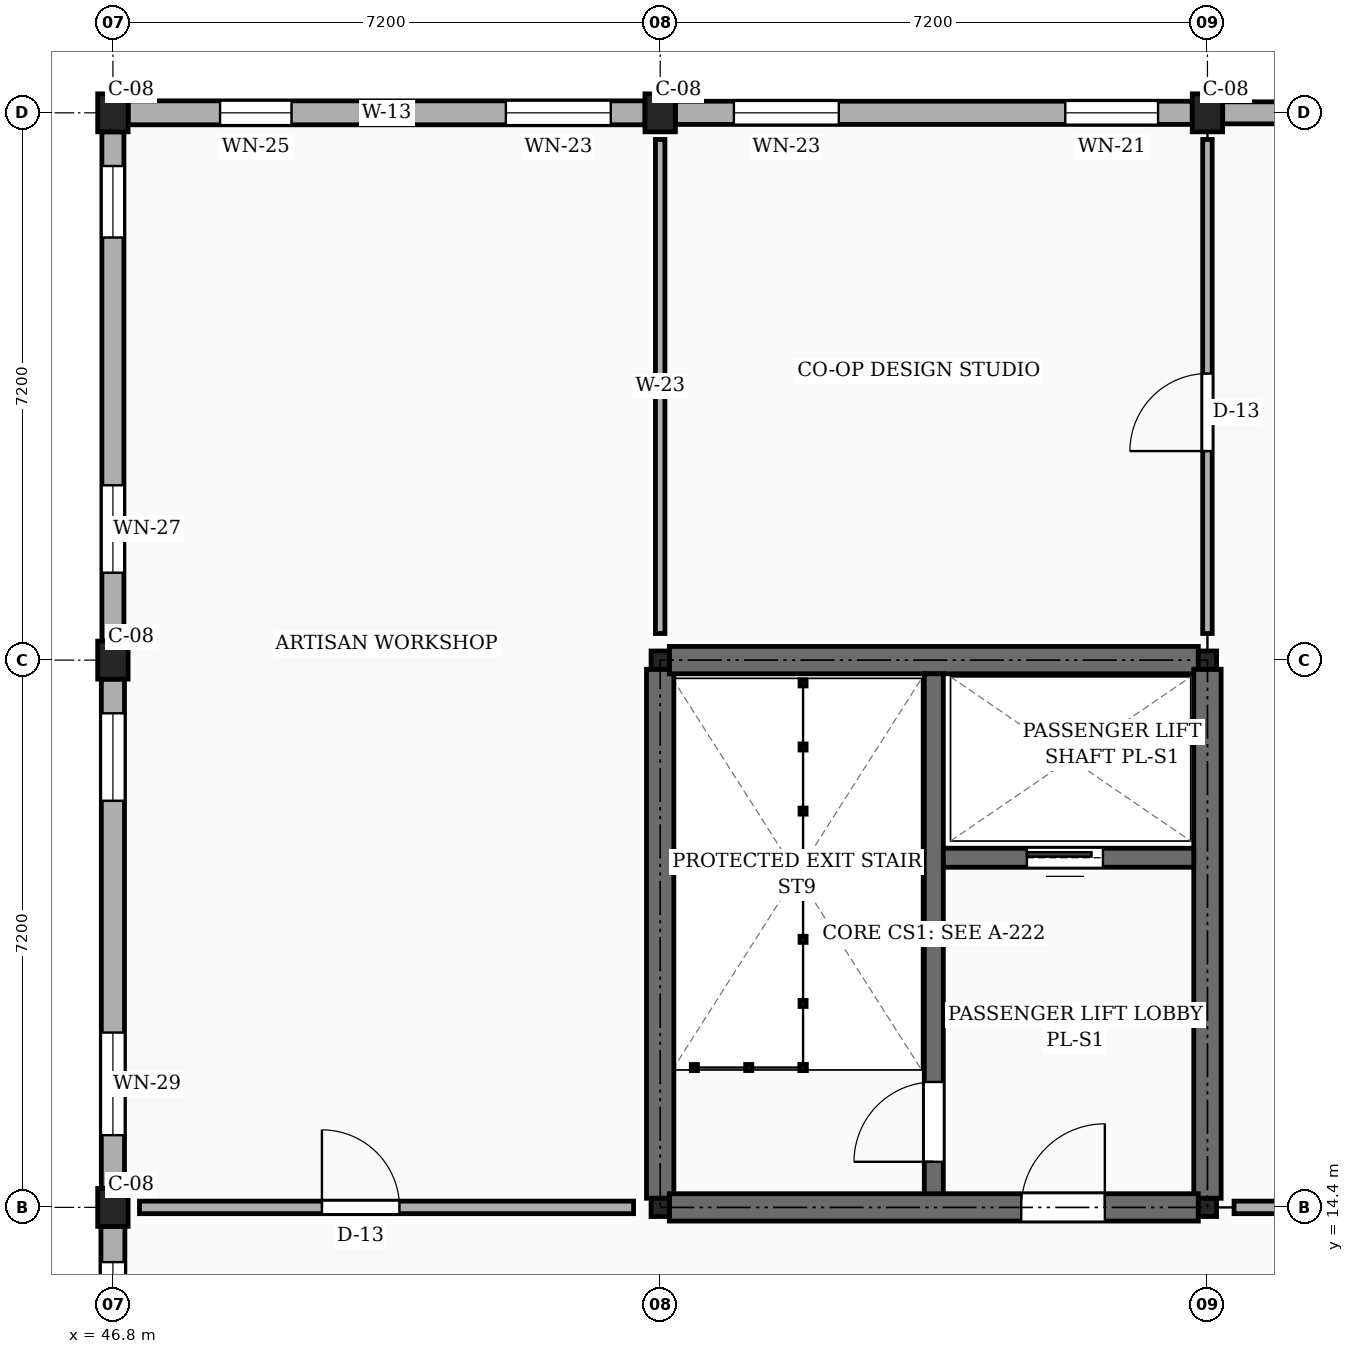
"""IFC4 building model, lengths in metres.
Left out: names, types, materials, properties, quantities, classifications, styles, units other than length and angle.
Written with IfcOpenShell. Run it as: python <this file> out.ifc"""

import sys

from ifc_helpers import new_model, si_unit, direction, frame, frame_2d, origin, origin_2d, place, context, subcontext, project, spatial, rectangle, i_section, extrude, element, fill, save


model = new_model("IFC4")
c1 = context("Model", 3, precision=1e-05, world=origin(), true_north=direction((0.0, 1.0)))
c2 = subcontext(c1, "Body", "Model", "MODEL_VIEW")
j1 = project(units=[si_unit("LENGTHUNIT", "METRE"), si_unit("PLANEANGLEUNIT", "RADIAN")], contexts=[c1])
p1 = place(None, origin())
s1 = spatial("IfcSite", under=j1, at=p1, CompositionType="ELEMENT")
p2 = place(p1, origin())
s2 = spatial("IfcBuilding", under=s1, at=p2, CompositionType="ELEMENT")
p3 = place(p2, frame((0.0, 0.0, 4.5)))
s3 = spatial("IfcBuildingStorey", under=s2, at=p3, CompositionType="ELEMENT", Elevation=4.5)
for number, where, z_axis, x_axis in (
    (1, (46.8, 14.4, 0.0), (0.0, 0.0, 1.0), (1.0, 0.0, 0.0)),
    (2, (46.8, 21.6, 0.0), (0.0, 0.0, 1.0), (1.0, 0.0, 0.0)),
    (3, (46.8, 28.8, 0.0), (0.0, 0.0, 1.0), (1.0, 0.0, 0.0)),
):
    element("IfcColumn", number, at=place(p3, frame(where, z_axis=z_axis, x_axis=x_axis)), inside=s3, PredefinedType="COLUMN", context=c2, shape_type="SweptSolid", body=[
        extrude(rectangle(XDim=0.4, YDim=0.5, at=origin_2d()), origin(), (0.0, 0.0, 1.0), 3.15),
    ])
for number, where, z_axis, x_axis in (
    (4, (54.0, 14.4, 0.0), (0.0, 0.0, 1.0), (1.0, 0.0, 0.0)),
    (5, (54.0, 21.6, 0.0), (0.0, 0.0, 1.0), (1.0, 0.0, 0.0)),
):
    element("IfcColumn", number, at=place(p3, frame(where, z_axis=z_axis, x_axis=x_axis)), inside=s3, PredefinedType="COLUMN", context=c2, shape_type="SweptSolid", body=[
        extrude(i_section(OverallWidth=0.24, OverallDepth=0.24, WebThickness=0.01, FlangeThickness=0.017, FilletRadius=0.021, at=origin_2d()), origin(), (0.0, 0.0, 1.0), 3.15),
    ])
p4 = place(p3, frame((54.0, 28.8, 0.0), z_axis=(0.0, 0.0, 1.0), x_axis=(1.0, 0.0, 0.0)))
e6 = element("IfcColumn", 6, at=p4, inside=s3, PredefinedType="COLUMN", context=c2, shape_type="SweptSolid", body=[
    extrude(rectangle(XDim=0.4, YDim=0.5, at=origin_2d()), origin(), (0.0, 0.0, 1.0), 3.15),
])
for number, where, z_axis, x_axis in (
    (7, (61.2, 14.4, 0.0), (0.0, 0.0, 1.0), (1.0, 0.0, 0.0)),
    (8, (61.2, 21.6, 0.0), (0.0, 0.0, 1.0), (1.0, 0.0, 0.0)),
):
    element("IfcColumn", number, at=place(p3, frame(where, z_axis=z_axis, x_axis=x_axis)), inside=s3, PredefinedType="COLUMN", context=c2, shape_type="SweptSolid", body=[
        extrude(i_section(OverallWidth=0.24, OverallDepth=0.24, WebThickness=0.01, FlangeThickness=0.017, FilletRadius=0.021, at=origin_2d()), origin(), (0.0, 0.0, 1.0), 3.15),
    ])
p5 = place(p3, frame((61.2, 28.8, 0.0), z_axis=(0.0, 0.0, 1.0), x_axis=(1.0, 0.0, 0.0)))
e9 = element("IfcColumn", 9, at=p5, inside=s3, PredefinedType="COLUMN", context=c2, shape_type="SweptSolid", body=[
    extrude(rectangle(XDim=0.4, YDim=0.5, at=origin_2d()), origin(), (0.0, 0.0, 1.0), 3.15),
])
p6 = place(p3, frame((68.2, 28.8, 0.0), z_axis=(0.0, 0.0, 1.0), x_axis=(-1.0, 0.0, 0.0)))
e10 = element("IfcWall", 10, at=p6, inside=s3, PredefinedType="SOLIDWALL", context=c2, shape_type="SweptSolid", body=[
    extrude(rectangle(XDim=6.8, YDim=0.29, at=frame_2d((3.4, 0.0))), origin(), (0.0, 0.0, 1.0), 2.34),
])
p7 = place(p6, frame((0.45, 0.0, 0.78)))
e11 = element("IfcOpeningElement", 11, at=p7, cuts=e10, PredefinedType="OPENING", context=c2, shape_type="SweptSolid", body=[
    extrude(rectangle(XDim=1.06, YDim=1.36, at=frame_2d((0.53, 0.68))), frame((0.0, 0.155, 0.0), z_axis=(0.0, -1.0, 0.0), x_axis=(1.0, 0.0, 0.0)), (0.0, 0.0, 1.0), 0.31),
])
p8 = place(p6, frame((4.65, 0.0, 0.78)))
e12 = element("IfcOpeningElement", 12, at=p8, cuts=e10, PredefinedType="OPENING", context=c2, shape_type="SweptSolid", body=[
    extrude(rectangle(XDim=1.22, YDim=1.36, at=frame_2d((0.61, 0.68))), frame((0.0, 0.155, 0.0), z_axis=(0.0, -1.0, 0.0), x_axis=(1.0, 0.0, 0.0)), (0.0, 0.0, 1.0), 0.31),
])
p9 = place(p3, frame((61.0, 28.8, 0.0), z_axis=(0.0, 0.0, 1.0), x_axis=(-1.0, 0.0, 0.0)))
e13 = element("IfcWall", 13, at=p9, inside=s3, PredefinedType="SOLIDWALL", context=c2, shape_type="SweptSolid", body=[
    extrude(rectangle(XDim=6.8, YDim=0.305, at=frame_2d((3.4, 0.0))), origin(), (0.0, 0.0, 1.0), 2.34),
])
p10 = place(p9, frame((0.45, 0.0, 0.78)))
e14 = element("IfcOpeningElement", 14, at=p10, cuts=e13, PredefinedType="OPENING", context=c2, shape_type="SweptSolid", body=[
    extrude(rectangle(XDim=1.22, YDim=1.36, at=frame_2d((0.61, 0.68))), frame((0.0, 0.163, 0.0), z_axis=(0.0, -1.0, 0.0), x_axis=(1.0, 0.0, 0.0)), (0.0, 0.0, 1.0), 0.325),
])
p11 = place(p9, frame((4.65, 0.0, 0.78)))
e15 = element("IfcOpeningElement", 15, at=p11, cuts=e13, PredefinedType="OPENING", context=c2, shape_type="SweptSolid", body=[
    extrude(rectangle(XDim=1.38, YDim=1.36, at=frame_2d((0.69, 0.68))), frame((0.0, 0.163, 0.0), z_axis=(0.0, -1.0, 0.0), x_axis=(1.0, 0.0, 0.0)), (0.0, 0.0, 1.0), 0.325),
])
p12 = place(p3, frame((53.8, 28.8, 0.0), z_axis=(0.0, 0.0, 1.0), x_axis=(-1.0, 0.0, 0.0)))
e16 = element("IfcWall", 16, at=p12, inside=s3, PredefinedType="SOLIDWALL", context=c2, shape_type="SweptSolid", body=[
    extrude(rectangle(XDim=6.8, YDim=0.315, at=frame_2d((3.4, 0.0))), origin(), (0.0, 0.0, 1.0), 2.34),
])
p13 = place(p12, frame((0.45, 0.0, 0.78)))
e17 = element("IfcOpeningElement", 17, at=p13, cuts=e16, PredefinedType="OPENING", context=c2, shape_type="SweptSolid", body=[
    extrude(rectangle(XDim=1.38, YDim=1.36, at=frame_2d((0.69, 0.68))), frame((0.0, 0.167, 0.0), z_axis=(0.0, -1.0, 0.0), x_axis=(1.0, 0.0, 0.0)), (0.0, 0.0, 1.0), 0.335),
])
p14 = place(p12, frame((4.65, 0.0, 0.78)))
e18 = element("IfcOpeningElement", 18, at=p14, cuts=e16, PredefinedType="OPENING", context=c2, shape_type="SweptSolid", body=[
    extrude(rectangle(XDim=0.94, YDim=1.44, at=frame_2d((0.47, 0.72))), frame((0.0, 0.167, 0.0), z_axis=(0.0, -1.0, 0.0), x_axis=(1.0, 0.0, 0.0)), (0.0, 0.0, 1.0), 0.335),
])
p15 = place(p3, frame((46.8, 28.55, 0.0), z_axis=(0.0, 0.0, 1.0), x_axis=(0.0, -1.0, 0.0)))
e19 = element("IfcWall", 19, at=p15, inside=s3, PredefinedType="SOLIDWALL", context=c2, shape_type="SweptSolid", body=[
    extrude(rectangle(XDim=6.7, YDim=0.29, at=frame_2d((3.35, 0.0))), origin(), (0.0, 0.0, 1.0), 2.34),
])
p16 = place(p15, frame((0.45, 0.0, 0.78)))
e20 = element("IfcOpeningElement", 20, at=p16, cuts=e19, PredefinedType="OPENING", context=c2, shape_type="SweptSolid", body=[
    extrude(rectangle(XDim=0.94, YDim=1.44, at=frame_2d((0.47, 0.72))), frame((0.0, 0.155, 0.0), z_axis=(0.0, -1.0, 0.0), x_axis=(1.0, 0.0, 0.0)), (0.0, 0.0, 1.0), 0.31),
])
p17 = place(p15, frame((4.65, 0.0, 0.78)))
e21 = element("IfcOpeningElement", 21, at=p17, cuts=e19, PredefinedType="OPENING", context=c2, shape_type="SweptSolid", body=[
    extrude(rectangle(XDim=1.15, YDim=1.44, at=frame_2d((0.575, 0.72))), frame((0.0, 0.155, 0.0), z_axis=(0.0, -1.0, 0.0), x_axis=(1.0, 0.0, 0.0)), (0.0, 0.0, 1.0), 0.31),
])
p18 = place(p3, frame((46.8, 21.35, 0.0), z_axis=(0.0, 0.0, 1.0), x_axis=(0.0, -1.0, 0.0)))
e22 = element("IfcWall", 22, at=p18, inside=s3, PredefinedType="SOLIDWALL", context=c2, shape_type="SweptSolid", body=[
    extrude(rectangle(XDim=6.7, YDim=0.305, at=frame_2d((3.35, 0.0))), origin(), (0.0, 0.0, 1.0), 2.34),
])
p19 = place(p18, frame((0.45, 0.0, 0.78)))
e23 = element("IfcOpeningElement", 23, at=p19, cuts=e22, PredefinedType="OPENING", context=c2, shape_type="SweptSolid", body=[
    extrude(rectangle(XDim=1.15, YDim=1.44, at=frame_2d((0.575, 0.72))), frame((0.0, 0.163, 0.0), z_axis=(0.0, -1.0, 0.0), x_axis=(1.0, 0.0, 0.0)), (0.0, 0.0, 1.0), 0.325),
])
p20 = place(p18, frame((4.65, 0.0, 0.78)))
e24 = element("IfcOpeningElement", 24, at=p20, cuts=e22, PredefinedType="OPENING", context=c2, shape_type="SweptSolid", body=[
    extrude(rectangle(XDim=1.35, YDim=1.44, at=frame_2d((0.675, 0.72))), frame((0.0, 0.163, 0.0), z_axis=(0.0, -1.0, 0.0), x_axis=(1.0, 0.0, 0.0)), (0.0, 0.0, 1.0), 0.325),
])
p21 = place(p3, frame((46.8, 14.15, 0.0), z_axis=(0.0, 0.0, 1.0), x_axis=(0.0, -1.0, 0.0)))
e25 = element("IfcWall", 25, at=p21, inside=s3, PredefinedType="SOLIDWALL", context=c2, shape_type="SweptSolid", body=[
    extrude(rectangle(XDim=6.7, YDim=0.315, at=frame_2d((3.35, 0.0))), origin(), (0.0, 0.0, 1.0), 2.34),
])
p22 = place(p21, frame((0.47, 0.0, 0.78)))
e26 = element("IfcOpeningElement", 26, at=p22, cuts=e25, PredefinedType="OPENING", context=c2, shape_type="SweptSolid", body=[
    extrude(rectangle(XDim=1.2, YDim=1.26, at=frame_2d((0.6, 0.63))), frame((0.0, 0.167, 0.0), z_axis=(0.0, -1.0, 0.0), x_axis=(1.0, 0.0, 0.0)), (0.0, 0.0, 1.0), 0.335),
])
p23 = place(p21, frame((3.855, 0.0, 0.78)))
e27 = element("IfcOpeningElement", 27, at=p23, cuts=e25, PredefinedType="OPENING", context=c2, shape_type="SweptSolid", body=[
    extrude(rectangle(XDim=0.85, YDim=1.15, at=frame_2d((0.425, 0.575))), frame((0.0, 0.167, 0.0), z_axis=(0.0, -1.0, 0.0), x_axis=(1.0, 0.0, 0.0)), (0.0, 0.0, 1.0), 0.335),
])
for number, where, z_axis, x_axis in (
    (28, (54.0, 14.52, 0.0), (0.0, 0.0, 1.0), (0.0, 1.0, 0.0)),
    (29, (54.12, 21.6, 0.0), (0.0, 0.0, 1.0), (1.0, 0.0, 0.0)),
    (30, (61.2, 14.52, 0.0), (0.0, 0.0, 1.0), (0.0, 1.0, 0.0)),
):
    element("IfcWall", number, at=place(p3, frame(where, z_axis=z_axis, x_axis=x_axis)), inside=s3, PredefinedType="SHEAR", context=c2, shape_type="SweptSolid", body=[
        extrude(rectangle(XDim=6.96, YDim=0.36, at=frame_2d((3.48, 0.0))), origin(), (0.0, 0.0, 1.0), 2.89),
    ])
p24 = place(p3, frame((54.12, 14.4, 0.0), z_axis=(0.0, 0.0, 1.0), x_axis=(1.0, 0.0, 0.0)))
e31 = element("IfcWall", 31, at=p24, inside=s3, PredefinedType="SHEAR", context=c2, shape_type="SweptSolid", body=[
    extrude(rectangle(XDim=6.96, YDim=0.36, at=frame_2d((3.48, 0.0))), origin(), (0.0, 0.0, 1.0), 2.89),
])
p25 = place(p24, frame((4.63, 0.0, 0.0)))
e32 = element("IfcOpeningElement", 32, at=p25, cuts=e31, PredefinedType="OPENING", context=c2, shape_type="SweptSolid", body=[
    extrude(rectangle(XDim=1.1, YDim=2.15, at=frame_2d((0.55, 1.075))), frame((0.0, 0.19, 0.0), z_axis=(0.0, -1.0, 0.0), x_axis=(1.0, 0.0, 0.0)), (0.0, 0.0, 1.0), 0.38),
])
p26 = place(p3, frame((57.6, 14.58, 0.0), z_axis=(0.0, 0.0, 1.0), x_axis=(0.0, 1.0, 0.0)))
e33 = element("IfcWall", 33, at=p26, inside=s3, PredefinedType="SHEAR", context=c2, shape_type="SweptSolid", body=[
    extrude(rectangle(XDim=6.84, YDim=0.25, at=frame_2d((3.42, 0.0))), origin(), (0.0, 0.0, 1.0), 2.89),
])
p27 = place(p26, frame((0.42, 0.0, 0.0)))
e34 = element("IfcOpeningElement", 34, at=p27, cuts=e33, PredefinedType="OPENING", context=c2, shape_type="SweptSolid", body=[
    extrude(rectangle(XDim=1.05, YDim=2.15, at=frame_2d((0.525, 1.075))), frame((0.0, 0.135, 0.0), z_axis=(0.0, -1.0, 0.0), x_axis=(1.0, 0.0, 0.0)), (0.0, 0.0, 1.0), 0.27),
])
p28 = place(p3, frame((57.725, 19.0, 0.0), z_axis=(0.0, 0.0, 1.0), x_axis=(1.0, 0.0, 0.0)))
e35 = element("IfcWall", 35, at=p28, inside=s3, PredefinedType="SHEAR", context=c2, shape_type="SweptSolid", body=[
    extrude(rectangle(XDim=3.295, YDim=0.25, at=frame_2d((1.647, 0.0))), origin(), (0.0, 0.0, 1.0), 2.89),
])
p29 = place(p28, frame((1.1, 0.0, 0.0)))
e36 = element("IfcOpeningElement", 36, at=p29, cuts=e35, PredefinedType="OPENING", context=c2, shape_type="SweptSolid", body=[
    extrude(rectangle(XDim=1.0, YDim=2.2, at=frame_2d((0.5, 1.1))), frame((0.0, 0.135, 0.0), z_axis=(0.0, -1.0, 0.0), x_axis=(1.0, 0.0, 0.0)), (0.0, 0.0, 1.0), 0.27),
])
p30 = place(p3, frame((47.15, 14.4, 0.0), z_axis=(0.0, 0.0, 1.0), x_axis=(1.0, 0.0, 0.0)))
e37 = element("IfcWall", 37, at=p30, inside=s3, PredefinedType="PARTITIONING", context=c2, shape_type="SweptSolid", body=[
    extrude(rectangle(XDim=6.5, YDim=0.165, at=frame_2d((3.25, 0.0))), origin(), (0.0, 0.0, 1.0), 2.29),
])
p31 = place(p30, frame((2.4, 0.0, 0.0)))
e38 = element("IfcOpeningElement", 38, at=p31, cuts=e37, PredefinedType="OPENING", context=c2, shape_type="SweptSolid", body=[
    extrude(rectangle(XDim=1.02, YDim=2.15, at=frame_2d((0.51, 1.075))), frame((0.0, 0.093, 0.0), z_axis=(0.0, -1.0, 0.0), x_axis=(1.0, 0.0, 0.0)), (0.0, 0.0, 1.0), 0.185),
])
p32 = place(p3, frame((61.55, 14.4, 0.0), z_axis=(0.0, 0.0, 1.0), x_axis=(1.0, 0.0, 0.0)))
e39 = element("IfcWall", 39, at=p32, inside=s3, PredefinedType="PARTITIONING", context=c2, shape_type="SweptSolid", body=[
    extrude(rectangle(XDim=13.7, YDim=0.165, at=frame_2d((6.85, 0.0))), origin(), (0.0, 0.0, 1.0), 2.29),
])
p33 = place(p32, frame((2.4, 0.0, 0.0)))
e40 = element("IfcOpeningElement", 40, at=p33, cuts=e39, PredefinedType="OPENING", context=c2, shape_type="SweptSolid", body=[
    extrude(rectangle(XDim=1.5, YDim=2.25, at=frame_2d((0.75, 1.125))), frame((0.0, 0.093, 0.0), z_axis=(0.0, -1.0, 0.0), x_axis=(1.0, 0.0, 0.0)), (0.0, 0.0, 1.0), 0.185),
])
p34 = place(p3, frame((54.0, 21.95, 0.0), z_axis=(0.0, 0.0, 1.0), x_axis=(0.0, 1.0, 0.0)))
e41 = element("IfcWall", 41, at=p34, inside=s3, PredefinedType="PARTITIONING", context=c2, shape_type="SweptSolid", body=[
    extrude(rectangle(XDim=6.5, YDim=0.125, at=frame_2d((3.25, 0.0))), origin(), (0.0, 0.0, 1.0), 2.29),
])
p35 = place(p3, frame((61.2, 21.95, 0.0), z_axis=(0.0, 0.0, 1.0), x_axis=(0.0, 1.0, 0.0)))
e42 = element("IfcWall", 42, at=p35, inside=s3, PredefinedType="PARTITIONING", context=c2, shape_type="SweptSolid", body=[
    extrude(rectangle(XDim=6.5, YDim=0.125, at=frame_2d((3.25, 0.0))), origin(), (0.0, 0.0, 1.0), 2.29),
])
p36 = place(p35, frame((2.4, 0.0, 0.0)))
e43 = element("IfcOpeningElement", 43, at=p36, cuts=e42, PredefinedType="OPENING", context=c2, shape_type="SweptSolid", body=[
    extrude(rectangle(XDim=1.02, YDim=2.15, at=frame_2d((0.51, 1.075))), frame((0.0, 0.073, 0.0), z_axis=(0.0, -1.0, 0.0), x_axis=(1.0, 0.0, 0.0)), (0.0, 0.0, 1.0), 0.145),
])
p37 = place(p10, origin())
e44 = element("IfcWindow", 44, at=p37, inside=s3, PartitioningType="SINGLE_PANEL", PredefinedType="WINDOW", context=c2, shape_type="SweptSolid", body=[
    extrude(rectangle(XDim=1.22, YDim=1.36, at=frame_2d((0.61, 0.68))), frame((0.0, 0.03, 0.0), z_axis=(0.0, -1.0, 0.0), x_axis=(1.0, 0.0, 0.0)), (0.0, 0.0, 1.0), 0.06),
])
fill(e14, e44)
p38 = place(p11, origin())
e45 = element("IfcWindow", 45, at=p38, inside=s3, PartitioningType="SINGLE_PANEL", PredefinedType="WINDOW", context=c2, shape_type="SweptSolid", body=[
    extrude(rectangle(XDim=1.38, YDim=1.36, at=frame_2d((0.69, 0.68))), frame((0.0, 0.03, 0.0), z_axis=(0.0, -1.0, 0.0), x_axis=(1.0, 0.0, 0.0)), (0.0, 0.0, 1.0), 0.06),
])
fill(e15, e45)
p39 = place(p13, origin())
e46 = element("IfcWindow", 46, at=p39, inside=s3, PartitioningType="SINGLE_PANEL", PredefinedType="WINDOW", context=c2, shape_type="SweptSolid", body=[
    extrude(rectangle(XDim=1.38, YDim=1.36, at=frame_2d((0.69, 0.68))), frame((0.0, 0.03, 0.0), z_axis=(0.0, -1.0, 0.0), x_axis=(1.0, 0.0, 0.0)), (0.0, 0.0, 1.0), 0.06),
])
fill(e17, e46)
p40 = place(p14, origin())
e47 = element("IfcWindow", 47, at=p40, inside=s3, PartitioningType="SINGLE_PANEL", PredefinedType="WINDOW", context=c2, shape_type="SweptSolid", body=[
    extrude(rectangle(XDim=0.94, YDim=1.44, at=frame_2d((0.47, 0.72))), frame((0.0, 0.03, 0.0), z_axis=(0.0, -1.0, 0.0), x_axis=(1.0, 0.0, 0.0)), (0.0, 0.0, 1.0), 0.06),
])
fill(e18, e47)
p41 = place(p16, origin())
e48 = element("IfcWindow", 48, at=p41, inside=s3, PartitioningType="SINGLE_PANEL", PredefinedType="WINDOW", context=c2, shape_type="SweptSolid", body=[
    extrude(rectangle(XDim=0.94, YDim=1.44, at=frame_2d((0.47, 0.72))), frame((0.0, 0.03, 0.0), z_axis=(0.0, -1.0, 0.0), x_axis=(1.0, 0.0, 0.0)), (0.0, 0.0, 1.0), 0.06),
])
fill(e20, e48)
p42 = place(p17, origin())
e49 = element("IfcWindow", 49, at=p42, inside=s3, PartitioningType="SINGLE_PANEL", PredefinedType="WINDOW", context=c2, shape_type="SweptSolid", body=[
    extrude(rectangle(XDim=1.15, YDim=1.44, at=frame_2d((0.575, 0.72))), frame((0.0, 0.03, 0.0), z_axis=(0.0, -1.0, 0.0), x_axis=(1.0, 0.0, 0.0)), (0.0, 0.0, 1.0), 0.06),
])
fill(e21, e49)
p43 = place(p19, origin())
e50 = element("IfcWindow", 50, at=p43, inside=s3, PartitioningType="SINGLE_PANEL", PredefinedType="WINDOW", context=c2, shape_type="SweptSolid", body=[
    extrude(rectangle(XDim=1.15, YDim=1.44, at=frame_2d((0.575, 0.72))), frame((0.0, 0.03, 0.0), z_axis=(0.0, -1.0, 0.0), x_axis=(1.0, 0.0, 0.0)), (0.0, 0.0, 1.0), 0.06),
])
fill(e23, e50)
p44 = place(p20, origin())
e51 = element("IfcWindow", 51, at=p44, inside=s3, PartitioningType="SINGLE_PANEL", PredefinedType="WINDOW", context=c2, shape_type="SweptSolid", body=[
    extrude(rectangle(XDim=1.35, YDim=1.44, at=frame_2d((0.675, 0.72))), frame((0.0, 0.03, 0.0), z_axis=(0.0, -1.0, 0.0), x_axis=(1.0, 0.0, 0.0)), (0.0, 0.0, 1.0), 0.06),
])
fill(e24, e51)
p45 = place(p22, origin())
e52 = element("IfcWindow", 52, at=p45, inside=s3, PartitioningType="SINGLE_PANEL", PredefinedType="WINDOW", context=c2, shape_type="SweptSolid", body=[
    extrude(rectangle(XDim=1.2, YDim=1.26, at=frame_2d((0.6, 0.63))), frame((0.0, 0.03, 0.0), z_axis=(0.0, -1.0, 0.0), x_axis=(1.0, 0.0, 0.0)), (0.0, 0.0, 1.0), 0.06),
])
fill(e26, e52)
p46 = place(p25, frame((1.1, 0.0, 0.0), z_axis=(0.0, 0.0, 1.0), x_axis=(-1.0, 0.0, 0.0)))
e53 = element("IfcDoor", 53, at=p46, inside=s3, OperationType="SINGLE_SWING_RIGHT", PredefinedType="DOOR", context=c2, shape_type="SweptSolid", body=[
    extrude(rectangle(XDim=1.1, YDim=2.15, at=frame_2d((0.55, 1.075))), frame((0.0, 0.025, 0.0), z_axis=(0.0, -1.0, 0.0), x_axis=(1.0, 0.0, 0.0)), (0.0, 0.0, 1.0), 0.05),
])
fill(e32, e53)
p47 = place(p27, origin())
e54 = element("IfcDoor", 54, at=p47, inside=s3, OperationType="SINGLE_SWING_LEFT", PredefinedType="DOOR", context=c2, shape_type="SweptSolid", body=[
    extrude(rectangle(XDim=1.05, YDim=2.15, at=frame_2d((0.525, 1.075))), frame((0.0, 0.025, 0.0), z_axis=(0.0, -1.0, 0.0), x_axis=(1.0, 0.0, 0.0)), (0.0, 0.0, 1.0), 0.05),
])
fill(e34, e54)
p48 = place(p29, origin())
e55 = element("IfcDoor", 55, at=p48, inside=s3, OperationType="SLIDING_TO_LEFT", PredefinedType="DOOR", context=c2, shape_type="SweptSolid", body=[
    extrude(rectangle(XDim=1.0, YDim=2.2, at=frame_2d((0.5, 1.1))), frame((0.0, 0.025, 0.0), z_axis=(0.0, -1.0, 0.0), x_axis=(1.0, 0.0, 0.0)), (0.0, 0.0, 1.0), 0.05),
])
fill(e36, e55)
p49 = place(p31, origin())
e56 = element("IfcDoor", 56, at=p49, inside=s3, OperationType="SINGLE_SWING_LEFT", PredefinedType="DOOR", context=c2, shape_type="SweptSolid", body=[
    extrude(rectangle(XDim=1.02, YDim=2.15, at=frame_2d((0.51, 1.075))), frame((0.0, 0.025, 0.0), z_axis=(0.0, -1.0, 0.0), x_axis=(1.0, 0.0, 0.0)), (0.0, 0.0, 1.0), 0.05),
])
fill(e38, e56)
p50 = place(p36, origin())
e57 = element("IfcDoor", 57, at=p50, inside=s3, OperationType="SINGLE_SWING_LEFT", PredefinedType="DOOR", context=c2, shape_type="SweptSolid", body=[
    extrude(rectangle(XDim=1.02, YDim=2.15, at=frame_2d((0.51, 1.075))), frame((0.0, 0.025, 0.0), z_axis=(0.0, -1.0, 0.0), x_axis=(1.0, 0.0, 0.0)), (0.0, 0.0, 1.0), 0.05),
])
fill(e43, e57)
save(model, sys.argv[1])
